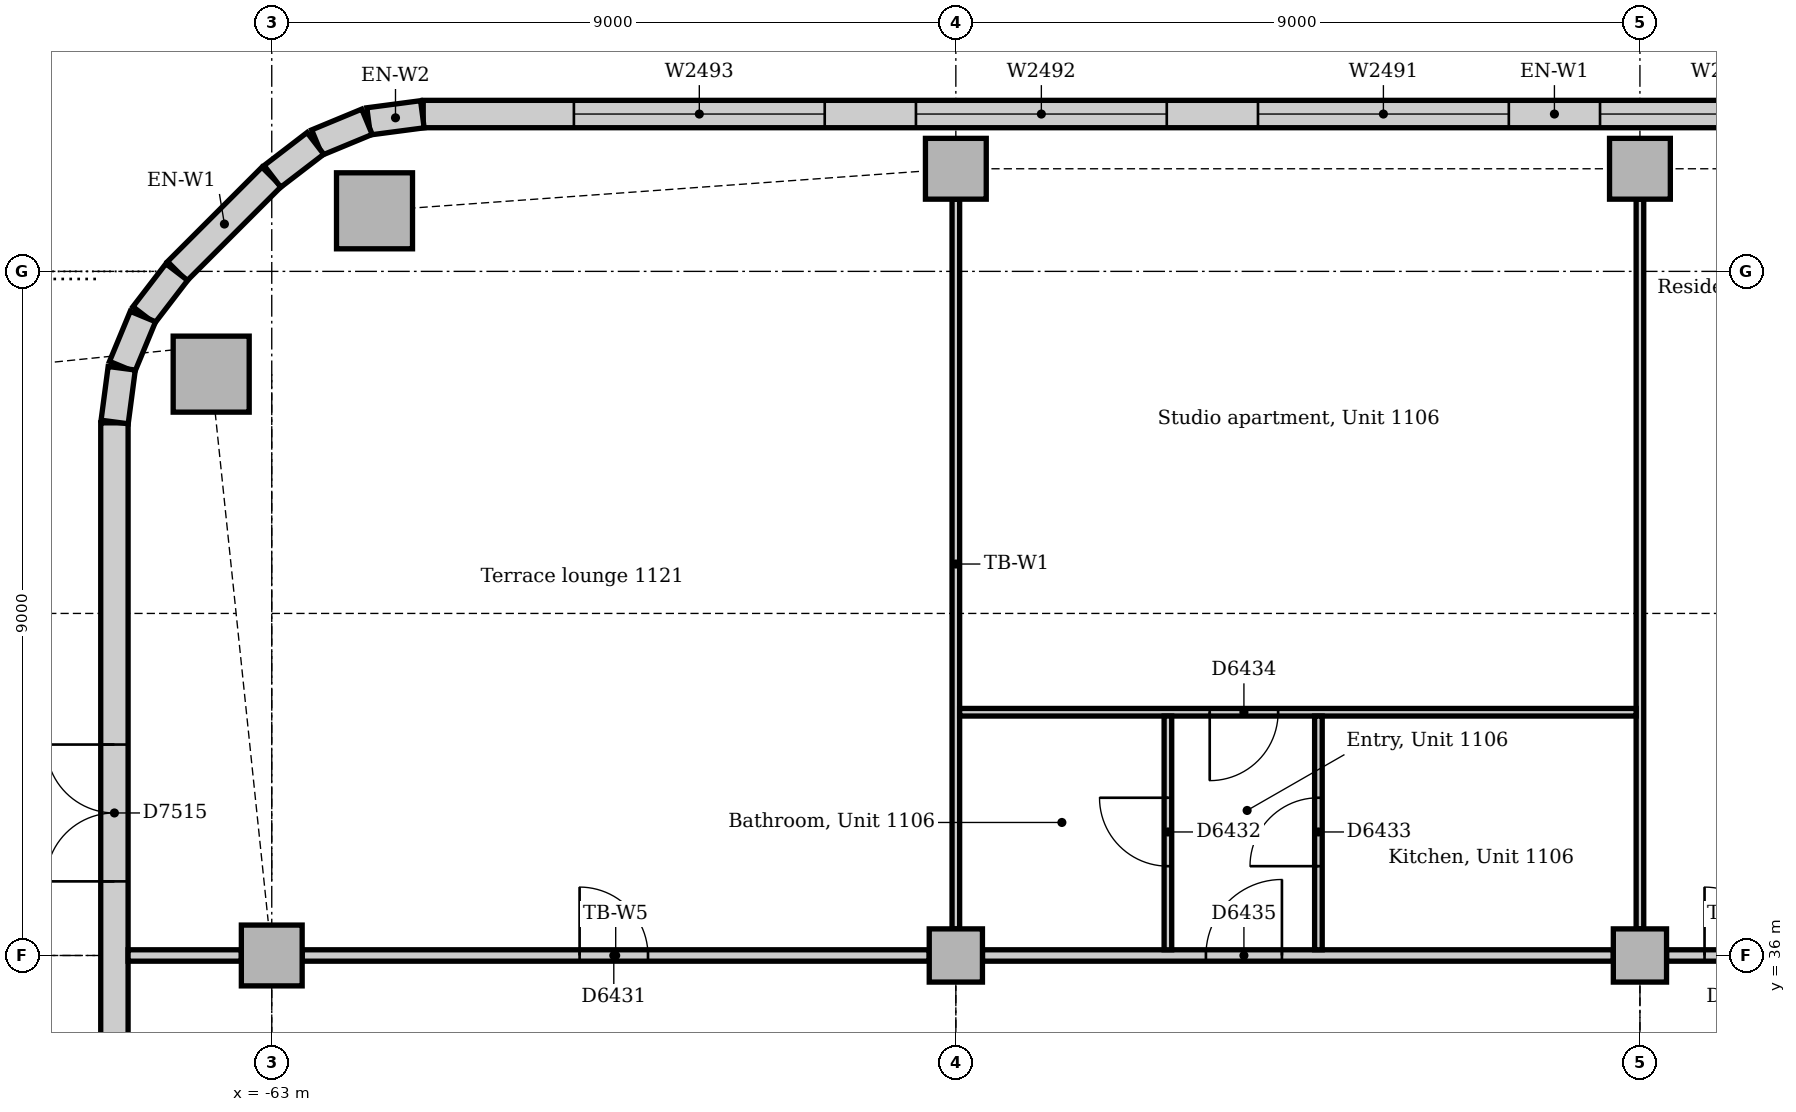
"""IFC4 building model, lengths in metres.
Left out: names, types, materials, properties, quantities, classifications, styles, units other than length and angle.
Written with IfcOpenShell. Run it as: python <this file> out.ifc"""

import sys

from ifc_helpers import new_model, si_unit, direction, frame, frame_2d, origin, origin_2d, place, context, subcontext, project, spatial, rectangle, extrude, element, fill, save


model = new_model("IFC4")
c1 = context("Model", 3, precision=1e-05, world=origin(), true_north=direction((0.0, 1.0)))
c2 = subcontext(c1, "Body", "Model", "MODEL_VIEW")
j1 = project(units=[si_unit("LENGTHUNIT", "METRE"), si_unit("PLANEANGLEUNIT", "RADIAN")], contexts=[c1])
p1 = place(None, origin())
s1 = spatial("IfcSite", under=j1, at=p1, CompositionType="ELEMENT")
p2 = place(p1, origin())
s2 = spatial("IfcBuilding", under=s1, at=p2, CompositionType="ELEMENT")
p3 = place(p2, frame((0.0, 0.0, 51.0)))
s3 = spatial("IfcBuildingStorey", under=s2, at=p3, CompositionType="ELEMENT", Elevation=51.0)
for number, where, z_axis, x_axis in (
    (1, (-61.648, 45.797, -0.15), (0.0, 0.0, 1.0), (1.0, 0.0, 0.0)),
    (2, (-63.797, 43.648, -0.15), (0.0, 0.0, 1.0), (1.0, 0.0, 0.0)),
):
    element("IfcColumn", number, at=place(p3, frame(where, z_axis=z_axis, x_axis=x_axis)), inside=s3, PredefinedType="COLUMN", context=c2, shape_type="SweptSolid", body=[
        extrude(rectangle(XDim=1.0, YDim=1.0, at=origin_2d()), origin(), (0.0, 0.0, 1.0), 4.0),
    ])
for number, where, z_axis, x_axis in (
    (3, (-54.0, 46.35, -0.15), (0.0, 0.0, 1.0), (1.0, 0.0, 0.0)),
    (4, (-45.0, 46.35, -0.15), (0.0, 0.0, 1.0), (1.0, 0.0, 0.0)),
    (5, (-63.0, 36.0, -0.15), (0.0, 0.0, 1.0), (1.0, 0.0, 0.0)),
):
    element("IfcColumn", number, at=place(p3, frame(where, z_axis=z_axis, x_axis=x_axis)), inside=s3, PredefinedType="COLUMN", context=c2, shape_type="SweptSolid", body=[
        extrude(rectangle(XDim=0.8, YDim=0.8, at=origin_2d()), origin(), (0.0, 0.0, 1.0), 4.0),
    ])
for number, where, z_axis, x_axis in (
    (6, (-54.0, 36.0, 0.0), (0.0, 0.0, 1.0), (1.0, 0.0, 0.0)),
    (7, (-45.0, 36.0, 0.0), (0.0, 0.0, 1.0), (1.0, 0.0, 0.0)),
):
    element("IfcColumn", number, at=place(p3, frame(where, z_axis=z_axis, x_axis=x_axis)), inside=s3, PredefinedType="COLUMN", context=c2, shape_type="SweptSolid", body=[
        extrude(rectangle(XDim=0.7, YDim=0.7, at=origin_2d()), origin(), (0.0, 0.0, 1.0), 3.85),
    ])
p4 = place(p3, frame((-31.243, 47.07, 0.0), z_axis=(0.0, 0.0, 1.0), x_axis=(-1.0, 0.0, 0.0)))
e8 = element("IfcWall", 8, at=p4, inside=s3, PredefinedType="STANDARD", context=c2, shape_type="SweptSolid", body=[
    extrude(rectangle(XDim=29.765, YDim=0.36, at=frame_2d((14.882, 0.0))), origin(), (0.0, 0.0, 1.0), 3.85),
])
p5 = place(p4, frame((1.982, 0.0, 0.9)))
e9 = element("IfcOpeningElement", 9, at=p5, cuts=e8, PredefinedType="OPENING", context=c2, shape_type="SweptSolid", body=[
    extrude(rectangle(XDim=3.3, YDim=1.6, at=frame_2d((1.65, 0.8))), frame((0.0, 0.19, 0.0), z_axis=(0.0, -1.0, 0.0), x_axis=(1.0, 0.0, 0.0)), (0.0, 0.0, 1.0), 0.38),
])
p6 = place(p4, frame((6.482, 0.0, 0.9)))
e10 = element("IfcOpeningElement", 10, at=p6, cuts=e8, PredefinedType="OPENING", context=c2, shape_type="SweptSolid", body=[
    extrude(rectangle(XDim=3.3, YDim=1.6, at=frame_2d((1.65, 0.8))), frame((0.0, 0.19, 0.0), z_axis=(0.0, -1.0, 0.0), x_axis=(1.0, 0.0, 0.0)), (0.0, 0.0, 1.0), 0.38),
])
p7 = place(p4, frame((10.982, 0.0, 0.9)))
e11 = element("IfcOpeningElement", 11, at=p7, cuts=e8, PredefinedType="OPENING", context=c2, shape_type="SweptSolid", body=[
    extrude(rectangle(XDim=3.3, YDim=1.6, at=frame_2d((1.65, 0.8))), frame((0.0, 0.19, 0.0), z_axis=(0.0, -1.0, 0.0), x_axis=(1.0, 0.0, 0.0)), (0.0, 0.0, 1.0), 0.38),
])
p8 = place(p4, frame((15.482, 0.0, 0.9)))
e12 = element("IfcOpeningElement", 12, at=p8, cuts=e8, PredefinedType="OPENING", context=c2, shape_type="SweptSolid", body=[
    extrude(rectangle(XDim=3.3, YDim=1.6, at=frame_2d((1.65, 0.8))), frame((0.0, 0.19, 0.0), z_axis=(0.0, -1.0, 0.0), x_axis=(1.0, 0.0, 0.0)), (0.0, 0.0, 1.0), 0.38),
])
p9 = place(p4, frame((19.982, 0.0, 0.9)))
e13 = element("IfcOpeningElement", 13, at=p9, cuts=e8, PredefinedType="OPENING", context=c2, shape_type="SweptSolid", body=[
    extrude(rectangle(XDim=3.3, YDim=1.6, at=frame_2d((1.65, 0.8))), frame((0.0, 0.19, 0.0), z_axis=(0.0, -1.0, 0.0), x_axis=(1.0, 0.0, 0.0)), (0.0, 0.0, 1.0), 0.38),
])
p10 = place(p4, frame((24.482, 0.0, 0.9)))
e14 = element("IfcOpeningElement", 14, at=p10, cuts=e8, PredefinedType="OPENING", context=c2, shape_type="SweptSolid", body=[
    extrude(rectangle(XDim=3.3, YDim=1.6, at=frame_2d((1.65, 0.8))), frame((0.0, 0.19, 0.0), z_axis=(0.0, -1.0, 0.0), x_axis=(1.0, 0.0, 0.0)), (0.0, 0.0, 1.0), 0.38),
])
p11 = place(p3, frame((-63.001, 46.244, 0.0), z_axis=(0.0, 0.0, 1.0), x_axis=(-0.707106781187, -0.707106781187, 0.0)))
e15 = element("IfcWall", 15, at=p11, inside=s3, PredefinedType="STANDARD", context=c2, shape_type="SweptSolid", body=[
    extrude(rectangle(XDim=1.757, YDim=0.36, at=frame_2d((0.879, 0.0))), origin(), (0.0, 0.0, 1.0), 3.85),
])
p12 = place(p3, frame((-65.07, 43.007, 0.0), z_axis=(0.0, 0.0, 1.0), x_axis=(0.0, -1.0, 0.0)))
e16 = element("IfcWall", 16, at=p12, inside=s3, PredefinedType="STANDARD", context=c2, shape_type="SweptSolid", body=[
    extrude(rectangle(XDim=23.765, YDim=0.36, at=frame_2d((11.882, 0.0))), origin(), (0.0, 0.0, 1.0), 3.85),
])
p13 = place(p12, frame((4.232, 0.0, 0.0)))
e17 = element("IfcOpeningElement", 17, at=p13, cuts=e16, PredefinedType="OPENING", context=c2, shape_type="SweptSolid", body=[
    extrude(rectangle(XDim=1.8, YDim=2.4, at=frame_2d((0.9, 1.2))), frame((0.0, 0.19, 0.0), z_axis=(0.0, -1.0, 0.0), x_axis=(1.0, 0.0, 0.0)), (0.0, 0.0, 1.0), 0.38),
])
p14 = place(p12, frame((9.332, 0.0, 0.9)))
e18 = element("IfcOpeningElement", 18, at=p14, cuts=e16, PredefinedType="OPENING", context=c2, shape_type="SweptSolid", body=[
    extrude(rectangle(XDim=1.8, YDim=1.6, at=frame_2d((0.9, 0.8))), frame((0.0, 0.19, 0.0), z_axis=(0.0, -1.0, 0.0), x_axis=(1.0, 0.0, 0.0)), (0.0, 0.0, 1.0), 0.38),
])
p15 = place(p12, frame((12.482, 0.0, 0.9)))
e19 = element("IfcOpeningElement", 19, at=p15, cuts=e16, PredefinedType="OPENING", context=c2, shape_type="SweptSolid", body=[
    extrude(rectangle(XDim=3.3, YDim=1.6, at=frame_2d((1.65, 0.8))), frame((0.0, 0.19, 0.0), z_axis=(0.0, -1.0, 0.0), x_axis=(1.0, 0.0, 0.0)), (0.0, 0.0, 1.0), 0.38),
])
p16 = place(p12, frame((16.982, 0.0, 0.9)))
e20 = element("IfcOpeningElement", 20, at=p16, cuts=e16, PredefinedType="OPENING", context=c2, shape_type="SweptSolid", body=[
    extrude(rectangle(XDim=3.3, YDim=1.6, at=frame_2d((1.65, 0.8))), frame((0.0, 0.19, 0.0), z_axis=(0.0, -1.0, 0.0), x_axis=(1.0, 0.0, 0.0)), (0.0, 0.0, 1.0), 0.38),
])
for number, where, z_axis, x_axis in (
    (21, (-61.019, 47.067, 0.0), (0.0, 0.0, 1.0), (-0.991, -0.131, 0.0)),
    (22, (-61.747, 46.968, 0.0), (0.0, 0.0, 1.0), (-0.924, -0.383, 0.0)),
):
    element("IfcWall", number, at=place(p3, frame(where, z_axis=z_axis, x_axis=x_axis)), inside=s3, PredefinedType="STANDARD", context=c2, shape_type="SweptSolid", body=[
        extrude(rectangle(XDim=0.713, YDim=0.36, at=frame_2d((0.356, 0.0))), origin(), (0.0, 0.0, 1.0), 3.85),
    ])
for number, where, z_axis, x_axis in (
    (23, (-62.425, 46.684, 0.0), (0.0, 0.0, 1.0), (-0.793, -0.609, 0.0)),
    (24, (-64.25, 44.991, 0.0), (0.0, 0.0, 1.0), (-0.609, -0.793, 0.0)),
):
    element("IfcWall", number, at=place(p3, frame(where, z_axis=z_axis, x_axis=x_axis)), inside=s3, PredefinedType="STANDARD", context=c2, shape_type="SweptSolid", body=[
        extrude(rectangle(XDim=0.713, YDim=0.36, at=frame_2d((0.357, 0.0))), origin(), (0.0, 0.0, 1.0), 3.85),
    ])
for number, where, z_axis, x_axis in (
    (25, (-64.695, 44.406, 0.0), (0.0, 0.0, 1.0), (-0.383, -0.924, 0.0)),
    (26, (-64.974, 43.726, 0.0), (0.0, 0.0, 1.0), (-0.131, -0.991, 0.0)),
):
    element("IfcWall", number, at=place(p3, frame(where, z_axis=z_axis, x_axis=x_axis)), inside=s3, PredefinedType="STANDARD", context=c2, shape_type="SweptSolid", body=[
        extrude(rectangle(XDim=0.713, YDim=0.36, at=frame_2d((0.356, 0.0))), origin(), (0.0, 0.0, 1.0), 3.85),
    ])
p17 = place(p3, frame((-44.65, 36.0, 0.0), z_axis=(0.0, 0.0, 1.0), x_axis=(1.0, 0.0, 0.0)))
e27 = element("IfcWall", 27, at=p17, inside=s3, PredefinedType="PARTITIONING", context=c2, shape_type="SweptSolid", body=[
    extrude(rectangle(XDim=1.925, YDim=0.15, at=frame_2d((0.963, 0.0))), origin(), (0.0, 0.0, 1.0), 3.602),
])
p18 = place(p17, frame((0.5, 0.0, 0.0)))
e28 = element("IfcOpeningElement", 28, at=p18, cuts=e27, PredefinedType="OPENING", context=c2, shape_type="SweptSolid", body=[
    extrude(rectangle(XDim=0.9, YDim=2.1, at=frame_2d((0.45, 1.05))), frame((0.0, 0.085, 0.0), z_axis=(0.0, -1.0, 0.0), x_axis=(1.0, 0.0, 0.0)), (0.0, 0.0, 1.0), 0.17),
])
p19 = place(p3, frame((-53.65, 36.0, 0.0), z_axis=(0.0, 0.0, 1.0), x_axis=(1.0, 0.0, 0.0)))
e29 = element("IfcWall", 29, at=p19, inside=s3, PredefinedType="PARTITIONING", context=c2, shape_type="SweptSolid", body=[
    extrude(rectangle(XDim=8.3, YDim=0.15, at=frame_2d((4.15, 0.0))), origin(), (0.0, 0.0, 1.0), 3.158),
])
p20 = place(p19, frame((2.94, 0.0, 0.0)))
e30 = element("IfcOpeningElement", 30, at=p20, cuts=e29, PredefinedType="OPENING", context=c2, shape_type="SweptSolid", body=[
    extrude(rectangle(XDim=1.0, YDim=2.1, at=frame_2d((0.5, 1.05))), frame((0.0, 0.085, 0.0), z_axis=(0.0, -1.0, 0.0), x_axis=(1.0, 0.0, 0.0)), (0.0, 0.0, 1.0), 0.17),
])
p21 = place(p3, frame((-62.6, 36.0, 0.0), z_axis=(0.0, 0.0, 1.0), x_axis=(1.0, 0.0, 0.0)))
e31 = element("IfcWall", 31, at=p21, inside=s3, PredefinedType="PARTITIONING", context=c2, shape_type="SweptSolid", body=[
    extrude(rectangle(XDim=8.25, YDim=0.15, at=frame_2d((4.125, 0.0))), origin(), (0.0, 0.0, 1.0), 3.158),
])
p22 = place(p21, frame((3.65, 0.0, 0.0)))
e32 = element("IfcOpeningElement", 32, at=p22, cuts=e31, PredefinedType="OPENING", context=c2, shape_type="SweptSolid", body=[
    extrude(rectangle(XDim=0.9, YDim=2.1, at=frame_2d((0.45, 1.05))), frame((0.0, 0.085, 0.0), z_axis=(0.0, -1.0, 0.0), x_axis=(1.0, 0.0, 0.0)), (0.0, 0.0, 1.0), 0.17),
])
p23 = place(p3, frame((-64.89, 36.0, 0.0), z_axis=(0.0, 0.0, 1.0), x_axis=(1.0, 0.0, 0.0)))
e33 = element("IfcWall", 33, at=p23, inside=s3, PredefinedType="PARTITIONING", context=c2, shape_type="SweptSolid", body=[
    extrude(rectangle(XDim=1.49, YDim=0.15, at=frame_2d((0.745, 0.0))), origin(), (0.0, 0.0, 1.0), 3.85),
])
for number, where, z_axis, x_axis in (
    (34, (-54.0, 36.35, 0.0), (0.0, 0.0, 1.0), (0.0, 1.0, 0.0)),
    (35, (-45.0, 36.35, 0.0), (0.0, 0.0, 1.0), (0.0, 1.0, 0.0)),
):
    element("IfcWall", number, at=place(p3, frame(where, z_axis=z_axis, x_axis=x_axis)), inside=s3, PredefinedType="PARTITIONING", context=c2, shape_type="SweptSolid", body=[
        extrude(rectangle(XDim=9.6, YDim=0.1, at=frame_2d((4.8, 0.0))), origin(), (0.0, 0.0, 1.0), 3.256),
    ])
p24 = place(p3, frame((-53.95, 39.2, 0.0), z_axis=(0.0, 0.0, 1.0), x_axis=(1.0, 0.0, 0.0)))
e36 = element("IfcWall", 36, at=p24, inside=s3, PredefinedType="PARTITIONING", context=c2, shape_type="SweptSolid", body=[
    extrude(rectangle(XDim=8.9, YDim=0.1, at=frame_2d((4.45, 0.0))), origin(), (0.0, 0.0, 1.0), 3.85),
])
p25 = place(p24, frame((3.29, 0.0, 0.0)))
e37 = element("IfcOpeningElement", 37, at=p25, cuts=e36, PredefinedType="OPENING", context=c2, shape_type="SweptSolid", body=[
    extrude(rectangle(XDim=0.9, YDim=2.1, at=frame_2d((0.45, 1.05))), frame((0.0, 0.06, 0.0), z_axis=(0.0, -1.0, 0.0), x_axis=(1.0, 0.0, 0.0)), (0.0, 0.0, 1.0), 0.12),
])
p26 = place(p3, frame((-51.21, 36.075, 0.0), z_axis=(0.0, 0.0, 1.0), x_axis=(0.0, 1.0, 0.0)))
e38 = element("IfcWall", 38, at=p26, inside=s3, PredefinedType="PARTITIONING", context=c2, shape_type="SweptSolid", body=[
    extrude(rectangle(XDim=3.075, YDim=0.1, at=frame_2d((1.538, 0.0))), origin(), (0.0, 0.0, 1.0), 3.85),
])
p27 = place(p26, frame((1.1, 0.0, 0.0)))
e39 = element("IfcOpeningElement", 39, at=p27, cuts=e38, PredefinedType="OPENING", context=c2, shape_type="SweptSolid", body=[
    extrude(rectangle(XDim=0.9, YDim=2.1, at=frame_2d((0.45, 1.05))), frame((0.0, 0.06, 0.0), z_axis=(0.0, -1.0, 0.0), x_axis=(1.0, 0.0, 0.0)), (0.0, 0.0, 1.0), 0.12),
])
p28 = place(p3, frame((-49.23, 36.075, 0.0), z_axis=(0.0, 0.0, 1.0), x_axis=(0.0, 1.0, 0.0)))
e40 = element("IfcWall", 40, at=p28, inside=s3, PredefinedType="PARTITIONING", context=c2, shape_type="SweptSolid", body=[
    extrude(rectangle(XDim=3.075, YDim=0.1, at=frame_2d((1.538, 0.0))), origin(), (0.0, 0.0, 1.0), 3.85),
])
p29 = place(p28, frame((1.1, 0.0, 0.0)))
e41 = element("IfcOpeningElement", 41, at=p29, cuts=e40, PredefinedType="OPENING", context=c2, shape_type="SweptSolid", body=[
    extrude(rectangle(XDim=0.9, YDim=2.1, at=frame_2d((0.45, 1.05))), frame((0.0, 0.06, 0.0), z_axis=(0.0, -1.0, 0.0), x_axis=(1.0, 0.0, 0.0)), (0.0, 0.0, 1.0), 0.12),
])
p30 = place(p7, origin())
e42 = element("IfcWindow", 42, at=p30, inside=s3, PartitioningType="SINGLE_PANEL", PredefinedType="WINDOW", context=c2, shape_type="SweptSolid", body=[
    extrude(rectangle(XDim=3.3, YDim=1.6, at=frame_2d((1.65, 0.8))), frame((0.0, 0.13, 0.0), z_axis=(0.0, -1.0, 0.0), x_axis=(1.0, 0.0, 0.0)), (0.0, 0.0, 1.0), 0.06),
])
fill(e11, e42)
p31 = place(p8, origin())
e43 = element("IfcWindow", 43, at=p31, inside=s3, PartitioningType="SINGLE_PANEL", PredefinedType="WINDOW", context=c2, shape_type="SweptSolid", body=[
    extrude(rectangle(XDim=3.3, YDim=1.6, at=frame_2d((1.65, 0.8))), frame((0.0, 0.13, 0.0), z_axis=(0.0, -1.0, 0.0), x_axis=(1.0, 0.0, 0.0)), (0.0, 0.0, 1.0), 0.06),
])
fill(e12, e43)
p32 = place(p9, origin())
e44 = element("IfcWindow", 44, at=p32, inside=s3, PartitioningType="SINGLE_PANEL", PredefinedType="WINDOW", context=c2, shape_type="SweptSolid", body=[
    extrude(rectangle(XDim=3.3, YDim=1.6, at=frame_2d((1.65, 0.8))), frame((0.0, 0.13, 0.0), z_axis=(0.0, -1.0, 0.0), x_axis=(1.0, 0.0, 0.0)), (0.0, 0.0, 1.0), 0.06),
])
fill(e13, e44)
p33 = place(p10, origin())
e45 = element("IfcWindow", 45, at=p33, inside=s3, PartitioningType="SINGLE_PANEL", PredefinedType="WINDOW", context=c2, shape_type="SweptSolid", body=[
    extrude(rectangle(XDim=3.3, YDim=1.6, at=frame_2d((1.65, 0.8))), frame((0.0, 0.13, 0.0), z_axis=(0.0, -1.0, 0.0), x_axis=(1.0, 0.0, 0.0)), (0.0, 0.0, 1.0), 0.06),
])
fill(e14, e45)
p34 = place(p13, frame((1.8, 0.0, 0.0), z_axis=(0.0, 0.0, 1.0), x_axis=(-1.0, 0.0, 0.0)))
e46 = element("IfcDoor", 46, at=p34, inside=s3, OperationType="DOUBLE_DOOR_SINGLE_SWING", PredefinedType="DOOR", context=c2, shape_type="SweptSolid", body=[
    extrude(rectangle(XDim=1.8, YDim=2.4, at=frame_2d((0.9, 1.2))), frame((0.0, -0.07, 0.0), z_axis=(0.0, -1.0, 0.0), x_axis=(1.0, 0.0, 0.0)), (0.0, 0.0, 1.0), 0.05),
])
fill(e17, e46)
p35 = place(p18, origin())
e47 = element("IfcDoor", 47, at=p35, inside=s3, OperationType="SINGLE_SWING_LEFT", PredefinedType="DOOR", context=c2, shape_type="SweptSolid", body=[
    extrude(rectangle(XDim=0.9, YDim=2.1, at=frame_2d((0.45, 1.05))), frame((0.0, 0.025, 0.0), z_axis=(0.0, -1.0, 0.0), x_axis=(1.0, 0.0, 0.0)), (0.0, 0.0, 1.0), 0.05),
])
fill(e28, e47)
p36 = place(p22, origin())
e48 = element("IfcDoor", 48, at=p36, inside=s3, OperationType="SINGLE_SWING_LEFT", PredefinedType="DOOR", context=c2, shape_type="SweptSolid", body=[
    extrude(rectangle(XDim=0.9, YDim=2.1, at=frame_2d((0.45, 1.05))), frame((0.0, 0.025, 0.0), z_axis=(0.0, -1.0, 0.0), x_axis=(1.0, 0.0, 0.0)), (0.0, 0.0, 1.0), 0.05),
])
fill(e32, e48)
p37 = place(p27, origin())
e49 = element("IfcDoor", 49, at=p37, inside=s3, OperationType="SINGLE_SWING_RIGHT", PredefinedType="DOOR", context=c2, shape_type="SweptSolid", body=[
    extrude(rectangle(XDim=0.9, YDim=2.1, at=frame_2d((0.45, 1.05))), frame((0.0, 0.025, 0.0), z_axis=(0.0, -1.0, 0.0), x_axis=(1.0, 0.0, 0.0)), (0.0, 0.0, 1.0), 0.05),
])
fill(e39, e49)
p38 = place(p29, origin())
e50 = element("IfcDoor", 50, at=p38, inside=s3, OperationType="SINGLE_SWING_LEFT", PredefinedType="DOOR", context=c2, shape_type="SweptSolid", body=[
    extrude(rectangle(XDim=0.9, YDim=2.1, at=frame_2d((0.45, 1.05))), frame((0.0, 0.025, 0.0), z_axis=(0.0, -1.0, 0.0), x_axis=(1.0, 0.0, 0.0)), (0.0, 0.0, 1.0), 0.05),
])
fill(e41, e50)
p39 = place(p25, frame((0.9, 0.0, 0.0), z_axis=(0.0, 0.0, 1.0), x_axis=(-1.0, 0.0, 0.0)))
e51 = element("IfcDoor", 51, at=p39, inside=s3, OperationType="SINGLE_SWING_RIGHT", PredefinedType="DOOR", context=c2, shape_type="SweptSolid", body=[
    extrude(rectangle(XDim=0.9, YDim=2.1, at=frame_2d((0.45, 1.05))), frame((0.0, 0.025, 0.0), z_axis=(0.0, -1.0, 0.0), x_axis=(1.0, 0.0, 0.0)), (0.0, 0.0, 1.0), 0.05),
])
fill(e37, e51)
p40 = place(p20, origin())
e52 = element("IfcDoor", 52, at=p40, inside=s3, OperationType="SINGLE_SWING_RIGHT", PredefinedType="DOOR", context=c2, shape_type="SweptSolid", body=[
    extrude(rectangle(XDim=1.0, YDim=2.1, at=frame_2d((0.5, 1.05))), frame((0.0, 0.025, 0.0), z_axis=(0.0, -1.0, 0.0), x_axis=(1.0, 0.0, 0.0)), (0.0, 0.0, 1.0), 0.05),
])
fill(e30, e52)
save(model, sys.argv[1])
